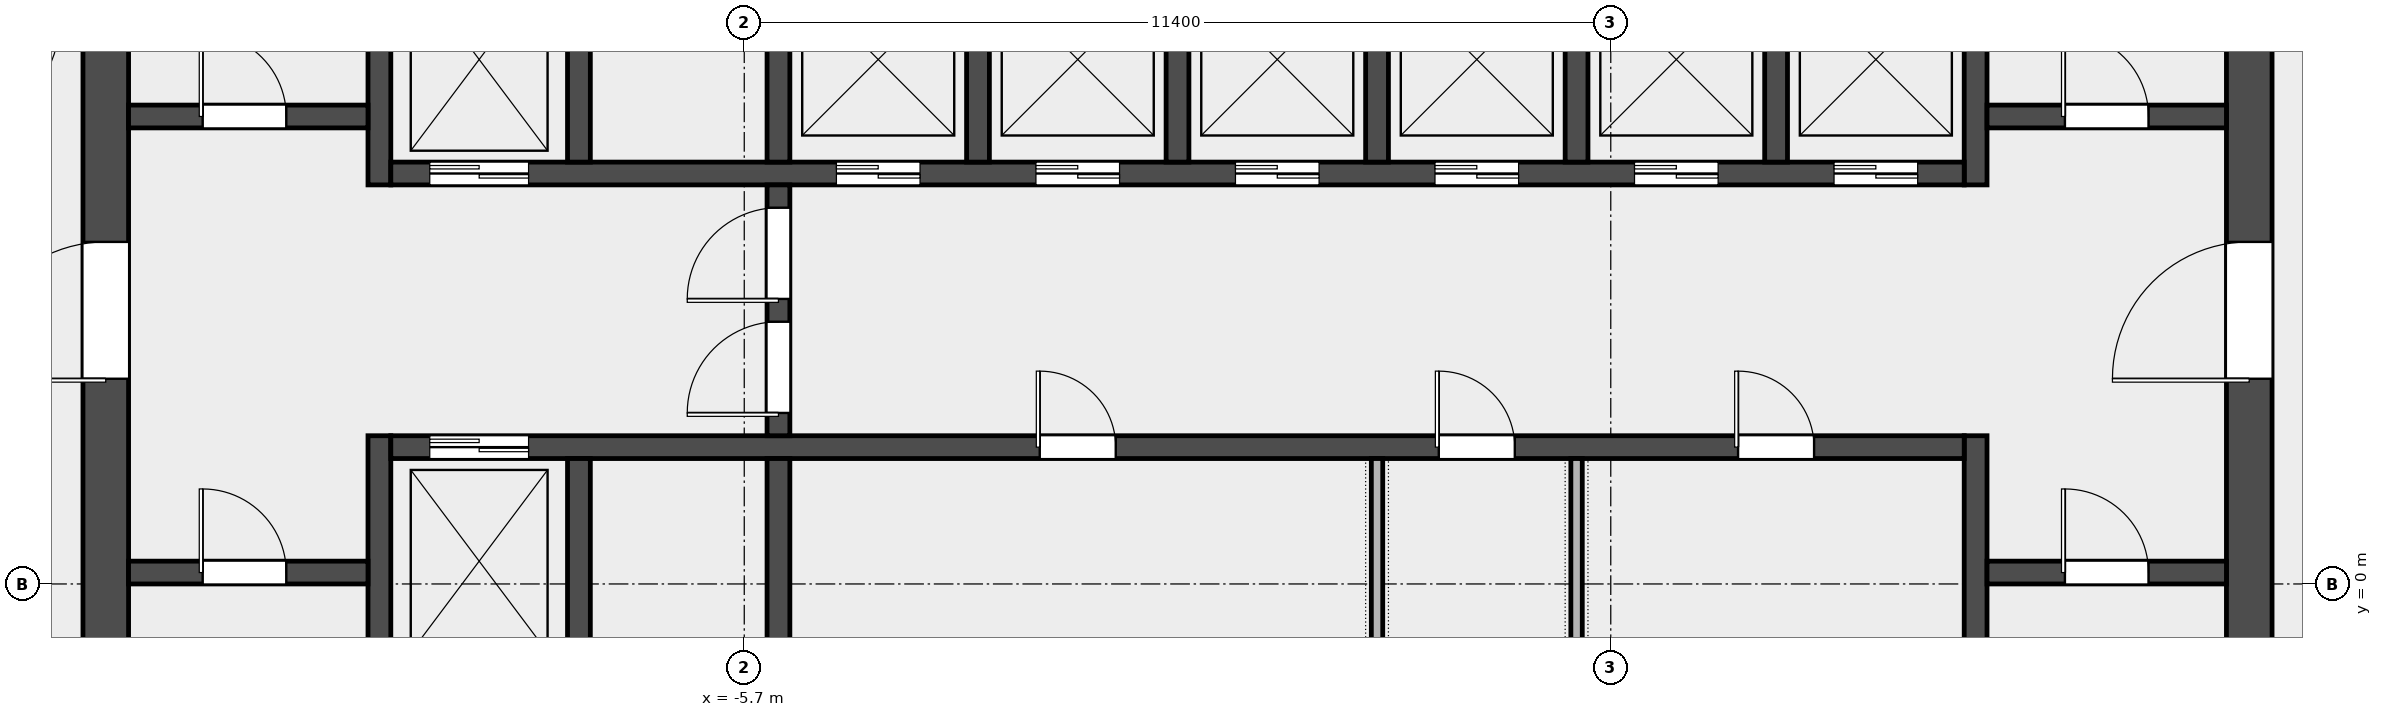
"""IFC4 building model, lengths in metres.
Left out: names, types, materials, properties, quantities, classifications, styles, units other than length and angle.
Written with IfcOpenShell. Run it as: python <this file> out.ifc"""

import sys

from ifc_helpers import new_model, si_unit, direction, frame, frame_2d, origin, place, context, subcontext, project, spatial, rectangle, extrude, element, fill, save


model = new_model("IFC4")
c1 = context("Model", 3, precision=1e-05, world=origin(), true_north=direction((0.0, 1.0)))
c2 = subcontext(c1, "Body", "Model", "MODEL_VIEW")
j1 = project(units=[si_unit("LENGTHUNIT", "METRE"), si_unit("PLANEANGLEUNIT", "RADIAN")], contexts=[c1])
p1 = place(None, origin())
s1 = spatial("IfcSite", under=j1, at=p1, CompositionType="ELEMENT")
p2 = place(p1, origin())
s2 = spatial("IfcBuilding", under=s1, at=p2, CompositionType="ELEMENT")
p3 = place(p2, frame((0.0, 0.0, 255.0)))
s3 = spatial("IfcBuildingStorey", under=s2, at=p3, CompositionType="ELEMENT", Elevation=255.0)
p4 = place(p3, frame((-14.1, -6.6, 0.0), z_axis=(0.0, 0.0, 1.0), x_axis=(0.0, 1.0, 0.0)))
e1 = element("IfcWall", 1, at=p4, inside=s3, PredefinedType="SHEAR", context=c2, shape_type="SweptSolid", body=[
    extrude(rectangle(XDim=19.5, YDim=0.6, at=frame_2d((9.75, 0.0))), origin(), (0.0, 0.0, 1.0), 3.7),
])
p5 = place(p4, frame((9.3, 0.0, 0.0)))
e2 = element("IfcOpeningElement", 2, at=p5, cuts=e1, PredefinedType="OPENING", context=c2, shape_type="SweptSolid", body=[
    extrude(rectangle(XDim=1.8, YDim=2.1, at=frame_2d((0.9, 1.05))), frame((0.0, 0.312, 0.0), z_axis=(0.0, -1.0, 0.0), x_axis=(1.0, 0.0, 0.0)), (0.0, 0.0, 1.0), 0.624),
])
p6 = place(p3, frame((14.1, -6.6, 0.0), z_axis=(0.0, 0.0, 1.0), x_axis=(0.0, 1.0, 0.0)))
e3 = element("IfcWall", 3, at=p6, inside=s3, PredefinedType="SHEAR", context=c2, shape_type="SweptSolid", body=[
    extrude(rectangle(XDim=19.5, YDim=0.6, at=frame_2d((9.75, 0.0))), origin(), (0.0, 0.0, 1.0), 3.7),
])
p7 = place(p6, frame((9.3, 0.0, 0.0)))
e4 = element("IfcOpeningElement", 4, at=p7, cuts=e3, PredefinedType="OPENING", context=c2, shape_type="SweptSolid", body=[
    extrude(rectangle(XDim=1.8, YDim=2.1, at=frame_2d((0.9, 1.05))), frame((0.0, 0.312, 0.0), z_axis=(0.0, -1.0, 0.0), x_axis=(1.0, 0.0, 0.0)), (0.0, 0.0, 1.0), 0.624),
])
p8 = place(p3, frame((-10.5, -6.6, 0.0), z_axis=(0.0, 0.0, 1.0), x_axis=(0.0, 1.0, 0.0)))
e5 = element("IfcWall", 5, at=p8, inside=s3, PredefinedType="SHEAR", context=c2, shape_type="SweptSolid", body=[
    extrude(rectangle(XDim=8.55, YDim=0.3, at=frame_2d((4.275, 0.0))), origin(), (0.0, 0.0, 1.0), 3.7),
])
p9 = place(p3, frame((-10.5, 5.25, 0.0), z_axis=(0.0, 0.0, 1.0), x_axis=(0.0, 1.0, 0.0)))
e6 = element("IfcWall", 6, at=p9, inside=s3, PredefinedType="SHEAR", context=c2, shape_type="SweptSolid", body=[
    extrude(rectangle(XDim=7.65, YDim=0.3, at=frame_2d((3.825, 0.0))), origin(), (0.0, 0.0, 1.0), 3.7),
])
p10 = place(p3, frame((10.5, -6.6, 0.0), z_axis=(0.0, 0.0, 1.0), x_axis=(0.0, 1.0, 0.0)))
e7 = element("IfcWall", 7, at=p10, inside=s3, PredefinedType="SHEAR", context=c2, shape_type="SweptSolid", body=[
    extrude(rectangle(XDim=8.55, YDim=0.3, at=frame_2d((4.275, 0.0))), origin(), (0.0, 0.0, 1.0), 3.7),
])
p11 = place(p3, frame((10.5, 5.25, 0.0), z_axis=(0.0, 0.0, 1.0), x_axis=(0.0, 1.0, 0.0)))
e8 = element("IfcWall", 8, at=p11, inside=s3, PredefinedType="SHEAR", context=c2, shape_type="SweptSolid", body=[
    extrude(rectangle(XDim=7.65, YDim=0.3, at=frame_2d((3.825, 0.0))), origin(), (0.0, 0.0, 1.0), 3.7),
])
p12 = place(p3, frame((-13.8, 0.15, 0.0), z_axis=(0.0, 0.0, 1.0), x_axis=(1.0, 0.0, 0.0)))
e9 = element("IfcWall", 9, at=p12, inside=s3, PredefinedType="SOLIDWALL", context=c2, shape_type="SweptSolid", body=[
    extrude(rectangle(XDim=3.15, YDim=0.3, at=frame_2d((1.575, 0.0))), origin(), (0.0, 0.0, 1.0), 3.7),
])
p13 = place(p12, frame((0.975, 0.0, 0.0)))
e10 = element("IfcOpeningElement", 10, at=p13, cuts=e9, PredefinedType="OPENING", context=c2, shape_type="SweptSolid", body=[
    extrude(rectangle(XDim=1.1, YDim=2.1, at=frame_2d((0.55, 1.05))), frame((0.0, 0.162, 0.0), z_axis=(0.0, -1.0, 0.0), x_axis=(1.0, 0.0, 0.0)), (0.0, 0.0, 1.0), 0.324),
])
p14 = place(p3, frame((-13.8, 6.15, 0.0), z_axis=(0.0, 0.0, 1.0), x_axis=(1.0, 0.0, 0.0)))
e11 = element("IfcWall", 11, at=p14, inside=s3, PredefinedType="SOLIDWALL", context=c2, shape_type="SweptSolid", body=[
    extrude(rectangle(XDim=3.15, YDim=0.3, at=frame_2d((1.575, 0.0))), origin(), (0.0, 0.0, 1.0), 3.7),
])
p15 = place(p14, frame((0.975, 0.0, 0.0)))
e12 = element("IfcOpeningElement", 12, at=p15, cuts=e11, PredefinedType="OPENING", context=c2, shape_type="SweptSolid", body=[
    extrude(rectangle(XDim=1.1, YDim=2.1, at=frame_2d((0.55, 1.05))), frame((0.0, 0.162, 0.0), z_axis=(0.0, -1.0, 0.0), x_axis=(1.0, 0.0, 0.0)), (0.0, 0.0, 1.0), 0.324),
])
p16 = place(p3, frame((10.65, 0.15, 0.0), z_axis=(0.0, 0.0, 1.0), x_axis=(1.0, 0.0, 0.0)))
e13 = element("IfcWall", 13, at=p16, inside=s3, PredefinedType="SOLIDWALL", context=c2, shape_type="SweptSolid", body=[
    extrude(rectangle(XDim=3.15, YDim=0.3, at=frame_2d((1.575, 0.0))), origin(), (0.0, 0.0, 1.0), 3.7),
])
p17 = place(p16, frame((1.025, 0.0, 0.0)))
e14 = element("IfcOpeningElement", 14, at=p17, cuts=e13, PredefinedType="OPENING", context=c2, shape_type="SweptSolid", body=[
    extrude(rectangle(XDim=1.1, YDim=2.1, at=frame_2d((0.55, 1.05))), frame((0.0, 0.162, 0.0), z_axis=(0.0, -1.0, 0.0), x_axis=(1.0, 0.0, 0.0)), (0.0, 0.0, 1.0), 0.324),
])
p18 = place(p3, frame((10.65, 6.15, 0.0), z_axis=(0.0, 0.0, 1.0), x_axis=(1.0, 0.0, 0.0)))
e15 = element("IfcWall", 15, at=p18, inside=s3, PredefinedType="SOLIDWALL", context=c2, shape_type="SweptSolid", body=[
    extrude(rectangle(XDim=3.15, YDim=0.3, at=frame_2d((1.575, 0.0))), origin(), (0.0, 0.0, 1.0), 3.7),
])
p19 = place(p18, frame((1.025, 0.0, 0.0)))
e16 = element("IfcOpeningElement", 16, at=p19, cuts=e15, PredefinedType="OPENING", context=c2, shape_type="SweptSolid", body=[
    extrude(rectangle(XDim=1.1, YDim=2.1, at=frame_2d((0.55, 1.05))), frame((0.0, 0.162, 0.0), z_axis=(0.0, -1.0, 0.0), x_axis=(1.0, 0.0, 0.0)), (0.0, 0.0, 1.0), 0.324),
])
p20 = place(p3, frame((-10.35, 1.8, 0.0), z_axis=(0.0, 0.0, 1.0), x_axis=(1.0, 0.0, 0.0)))
e17 = element("IfcWall", 17, at=p20, inside=s3, PredefinedType="SOLIDWALL", context=c2, shape_type="SweptSolid", body=[
    extrude(rectangle(XDim=20.7, YDim=0.3, at=frame_2d((10.35, 0.0))), origin(), (0.0, 0.0, 1.0), 3.7),
])
p21 = place(p20, frame((0.512, 0.0, 0.0)))
e18 = element("IfcOpeningElement", 18, at=p21, cuts=e17, PredefinedType="OPENING", context=c2, shape_type="SweptSolid", body=[
    extrude(rectangle(XDim=1.3, YDim=2.1, at=frame_2d((0.65, 1.05))), frame((0.0, 0.162, 0.0), z_axis=(0.0, -1.0, 0.0), x_axis=(1.0, 0.0, 0.0)), (0.0, 0.0, 1.0), 0.324),
])
p22 = place(p20, frame((8.538, 0.0, 0.0)))
e19 = element("IfcOpeningElement", 19, at=p22, cuts=e17, PredefinedType="OPENING", context=c2, shape_type="SweptSolid", body=[
    extrude(rectangle(XDim=1.0, YDim=2.1, at=frame_2d((0.5, 1.05))), frame((0.0, 0.162, 0.0), z_axis=(0.0, -1.0, 0.0), x_axis=(1.0, 0.0, 0.0)), (0.0, 0.0, 1.0), 0.324),
])
p23 = place(p20, frame((13.788, 0.0, 0.0)))
e20 = element("IfcOpeningElement", 20, at=p23, cuts=e17, PredefinedType="OPENING", context=c2, shape_type="SweptSolid", body=[
    extrude(rectangle(XDim=1.0, YDim=2.1, at=frame_2d((0.5, 1.05))), frame((0.0, 0.162, 0.0), z_axis=(0.0, -1.0, 0.0), x_axis=(1.0, 0.0, 0.0)), (0.0, 0.0, 1.0), 0.324),
])
p24 = place(p20, frame((17.725, 0.0, 0.0)))
e21 = element("IfcOpeningElement", 21, at=p24, cuts=e17, PredefinedType="OPENING", context=c2, shape_type="SweptSolid", body=[
    extrude(rectangle(XDim=1.0, YDim=2.1, at=frame_2d((0.5, 1.05))), frame((0.0, 0.162, 0.0), z_axis=(0.0, -1.0, 0.0), x_axis=(1.0, 0.0, 0.0)), (0.0, 0.0, 1.0), 0.324),
])
p25 = place(p3, frame((-10.35, 5.4, 0.0), z_axis=(0.0, 0.0, 1.0), x_axis=(1.0, 0.0, 0.0)))
e22 = element("IfcWall", 22, at=p25, inside=s3, PredefinedType="SOLIDWALL", context=c2, shape_type="SweptSolid", body=[
    extrude(rectangle(XDim=20.7, YDim=0.3, at=frame_2d((10.35, 0.0))), origin(), (0.0, 0.0, 1.0), 3.7),
])
p26 = place(p25, frame((0.512, 0.0, 0.0)))
e23 = element("IfcOpeningElement", 23, at=p26, cuts=e22, PredefinedType="OPENING", context=c2, shape_type="SweptSolid", body=[
    extrude(rectangle(XDim=1.3, YDim=2.1, at=frame_2d((0.65, 1.05))), frame((0.0, 0.162, 0.0), z_axis=(0.0, -1.0, 0.0), x_axis=(1.0, 0.0, 0.0)), (0.0, 0.0, 1.0), 0.324),
])
p27 = place(p25, frame((5.863, 0.0, 0.0)))
e24 = element("IfcOpeningElement", 24, at=p27, cuts=e22, PredefinedType="OPENING", context=c2, shape_type="SweptSolid", body=[
    extrude(rectangle(XDim=1.1, YDim=2.1, at=frame_2d((0.55, 1.05))), frame((0.0, 0.162, 0.0), z_axis=(0.0, -1.0, 0.0), x_axis=(1.0, 0.0, 0.0)), (0.0, 0.0, 1.0), 0.324),
])
p28 = place(p25, frame((8.488, 0.0, 0.0)))
e25 = element("IfcOpeningElement", 25, at=p28, cuts=e22, PredefinedType="OPENING", context=c2, shape_type="SweptSolid", body=[
    extrude(rectangle(XDim=1.1, YDim=2.1, at=frame_2d((0.55, 1.05))), frame((0.0, 0.162, 0.0), z_axis=(0.0, -1.0, 0.0), x_axis=(1.0, 0.0, 0.0)), (0.0, 0.0, 1.0), 0.324),
])
p29 = place(p25, frame((11.113, 0.0, 0.0)))
e26 = element("IfcOpeningElement", 26, at=p29, cuts=e22, PredefinedType="OPENING", context=c2, shape_type="SweptSolid", body=[
    extrude(rectangle(XDim=1.1, YDim=2.1, at=frame_2d((0.55, 1.05))), frame((0.0, 0.162, 0.0), z_axis=(0.0, -1.0, 0.0), x_axis=(1.0, 0.0, 0.0)), (0.0, 0.0, 1.0), 0.324),
])
p30 = place(p25, frame((13.738, 0.0, 0.0)))
e27 = element("IfcOpeningElement", 27, at=p30, cuts=e22, PredefinedType="OPENING", context=c2, shape_type="SweptSolid", body=[
    extrude(rectangle(XDim=1.1, YDim=2.1, at=frame_2d((0.55, 1.05))), frame((0.0, 0.162, 0.0), z_axis=(0.0, -1.0, 0.0), x_axis=(1.0, 0.0, 0.0)), (0.0, 0.0, 1.0), 0.324),
])
p31 = place(p25, frame((16.363, 0.0, 0.0)))
e28 = element("IfcOpeningElement", 28, at=p31, cuts=e22, PredefinedType="OPENING", context=c2, shape_type="SweptSolid", body=[
    extrude(rectangle(XDim=1.1, YDim=2.1, at=frame_2d((0.55, 1.05))), frame((0.0, 0.162, 0.0), z_axis=(0.0, -1.0, 0.0), x_axis=(1.0, 0.0, 0.0)), (0.0, 0.0, 1.0), 0.324),
])
p32 = place(p25, frame((18.988, 0.0, 0.0)))
e29 = element("IfcOpeningElement", 29, at=p32, cuts=e22, PredefinedType="OPENING", context=c2, shape_type="SweptSolid", body=[
    extrude(rectangle(XDim=1.1, YDim=2.1, at=frame_2d((0.55, 1.05))), frame((0.0, 0.162, 0.0), z_axis=(0.0, -1.0, 0.0), x_axis=(1.0, 0.0, 0.0)), (0.0, 0.0, 1.0), 0.324),
])
for number, where, z_axis, x_axis in (
    (30, (-7.875, -1.05, 0.0), (0.0, 0.0, 1.0), (0.0, 1.0, 0.0)),
    (31, (-5.25, -1.05, 0.0), (0.0, 0.0, 1.0), (0.0, 1.0, 0.0)),
    (32, (-7.875, 5.55, 0.0), (0.0, 0.0, 1.0), (0.0, 1.0, 0.0)),
    (33, (-5.25, 5.55, 0.0), (0.0, 0.0, 1.0), (0.0, 1.0, 0.0)),
    (34, (-2.625, 5.55, 0.0), (0.0, 0.0, 1.0), (0.0, 1.0, 0.0)),
    (35, (0.0, 5.55, 0.0), (0.0, 0.0, 1.0), (0.0, 1.0, 0.0)),
    (36, (2.625, 5.55, 0.0), (0.0, 0.0, 1.0), (0.0, 1.0, 0.0)),
    (37, (5.25, 5.55, 0.0), (0.0, 0.0, 1.0), (0.0, 1.0, 0.0)),
    (38, (7.875, 5.55, 0.0), (0.0, 0.0, 1.0), (0.0, 1.0, 0.0)),
):
    element("IfcWall", number, at=place(p3, frame(where, z_axis=z_axis, x_axis=x_axis)), inside=s3, PredefinedType="SOLIDWALL", context=c2, shape_type="SweptSolid", body=[
        extrude(rectangle(XDim=2.7, YDim=0.3, at=frame_2d((1.35, 0.0))), origin(), (0.0, 0.0, 1.0), 3.7),
    ])
p33 = place(p3, frame((-5.25, 1.95, 0.0), z_axis=(0.0, 0.0, 1.0), x_axis=(0.0, 1.0, 0.0)))
e39 = element("IfcWall", 39, at=p33, inside=s3, PredefinedType="SOLIDWALL", context=c2, shape_type="SweptSolid", body=[
    extrude(rectangle(XDim=3.3, YDim=0.3, at=frame_2d((1.65, 0.0))), origin(), (0.0, 0.0, 1.0), 3.7),
])
p34 = place(p33, frame((0.3, 0.0, 0.0)))
e40 = element("IfcOpeningElement", 40, at=p34, cuts=e39, PredefinedType="OPENING", context=c2, shape_type="SweptSolid", body=[
    extrude(rectangle(XDim=1.2, YDim=2.1, at=frame_2d((0.6, 1.05))), frame((0.0, 0.162, 0.0), z_axis=(0.0, -1.0, 0.0), x_axis=(1.0, 0.0, 0.0)), (0.0, 0.0, 1.0), 0.324),
])
p35 = place(p33, frame((1.8, 0.0, 0.0)))
e41 = element("IfcOpeningElement", 41, at=p35, cuts=e39, PredefinedType="OPENING", context=c2, shape_type="SweptSolid", body=[
    extrude(rectangle(XDim=1.2, YDim=2.1, at=frame_2d((0.6, 1.05))), frame((0.0, 0.162, 0.0), z_axis=(0.0, -1.0, 0.0), x_axis=(1.0, 0.0, 0.0)), (0.0, 0.0, 1.0), 0.324),
])
for number, where, z_axis, x_axis in (
    (42, (2.625, -1.05, 0.0), (0.0, 0.0, 1.0), (0.0, 1.0, 0.0)),
    (43, (5.25, -1.05, 0.0), (0.0, 0.0, 1.0), (0.0, 1.0, 0.0)),
):
    element("IfcWall", number, at=place(p3, frame(where, z_axis=z_axis, x_axis=x_axis)), inside=s3, PredefinedType="PARTITIONING", context=c2, shape_type="SweptSolid", body=[
        extrude(rectangle(XDim=2.7, YDim=0.15, at=frame_2d((1.35, 0.0))), origin(), (0.0, 0.0, 1.0), 3.7),
    ])
p36 = place(p13, origin())
e44 = element("IfcDoor", 44, at=p36, inside=s3, OperationType="SINGLE_SWING_LEFT", PredefinedType="DOOR", context=c2, shape_type="SweptSolid", body=[
    extrude(rectangle(XDim=1.1, YDim=2.1, at=frame_2d((0.55, 1.05))), frame((0.0, 0.025, 0.0), z_axis=(0.0, -1.0, 0.0), x_axis=(1.0, 0.0, 0.0)), (0.0, 0.0, 1.0), 0.05),
])
fill(e10, e44)
p37 = place(p15, origin())
e45 = element("IfcDoor", 45, at=p37, inside=s3, OperationType="SINGLE_SWING_LEFT", PredefinedType="DOOR", context=c2, shape_type="SweptSolid", body=[
    extrude(rectangle(XDim=1.1, YDim=2.1, at=frame_2d((0.55, 1.05))), frame((0.0, 0.025, 0.0), z_axis=(0.0, -1.0, 0.0), x_axis=(1.0, 0.0, 0.0)), (0.0, 0.0, 1.0), 0.05),
])
fill(e12, e45)
p38 = place(p17, origin())
e46 = element("IfcDoor", 46, at=p38, inside=s3, OperationType="SINGLE_SWING_RIGHT", PredefinedType="DOOR", context=c2, shape_type="SweptSolid", body=[
    extrude(rectangle(XDim=1.1, YDim=2.1, at=frame_2d((0.55, 1.05))), frame((0.0, 0.025, 0.0), z_axis=(0.0, -1.0, 0.0), x_axis=(1.0, 0.0, 0.0)), (0.0, 0.0, 1.0), 0.05),
])
fill(e14, e46)
p39 = place(p19, origin())
e47 = element("IfcDoor", 47, at=p39, inside=s3, OperationType="SINGLE_SWING_RIGHT", PredefinedType="DOOR", context=c2, shape_type="SweptSolid", body=[
    extrude(rectangle(XDim=1.1, YDim=2.1, at=frame_2d((0.55, 1.05))), frame((0.0, 0.025, 0.0), z_axis=(0.0, -1.0, 0.0), x_axis=(1.0, 0.0, 0.0)), (0.0, 0.0, 1.0), 0.05),
])
fill(e16, e47)
p40 = place(p5, origin())
e48 = element("IfcDoor", 48, at=p40, inside=s3, OperationType="DOUBLE_DOOR_SINGLE_SWING", PredefinedType="DOOR", context=c2, shape_type="SweptSolid", body=[
    extrude(rectangle(XDim=1.8, YDim=2.1, at=frame_2d((0.9, 1.05))), frame((0.0, 0.025, 0.0), z_axis=(0.0, -1.0, 0.0), x_axis=(1.0, 0.0, 0.0)), (0.0, 0.0, 1.0), 0.05),
])
fill(e2, e48)
p41 = place(p7, origin())
e49 = element("IfcDoor", 49, at=p41, inside=s3, OperationType="DOUBLE_DOOR_SINGLE_SWING", PredefinedType="DOOR", context=c2, shape_type="SweptSolid", body=[
    extrude(rectangle(XDim=1.8, YDim=2.1, at=frame_2d((0.9, 1.05))), frame((0.0, 0.025, 0.0), z_axis=(0.0, -1.0, 0.0), x_axis=(1.0, 0.0, 0.0)), (0.0, 0.0, 1.0), 0.05),
])
fill(e4, e49)
p42 = place(p34, origin())
e50 = element("IfcDoor", 50, at=p42, inside=s3, OperationType="SINGLE_SWING_LEFT", PredefinedType="DOOR", context=c2, shape_type="SweptSolid", body=[
    extrude(rectangle(XDim=1.2, YDim=2.1, at=frame_2d((0.6, 1.05))), frame((0.0, 0.025, 0.0), z_axis=(0.0, -1.0, 0.0), x_axis=(1.0, 0.0, 0.0)), (0.0, 0.0, 1.0), 0.05),
])
fill(e40, e50)
p43 = place(p35, origin())
e51 = element("IfcDoor", 51, at=p43, inside=s3, OperationType="SINGLE_SWING_RIGHT", PredefinedType="DOOR", context=c2, shape_type="SweptSolid", body=[
    extrude(rectangle(XDim=1.2, YDim=2.1, at=frame_2d((0.6, 1.05))), frame((0.0, 0.025, 0.0), z_axis=(0.0, -1.0, 0.0), x_axis=(1.0, 0.0, 0.0)), (0.0, 0.0, 1.0), 0.05),
])
fill(e41, e51)
p44 = place(p21, origin())
e52 = element("IfcDoor", 52, at=p44, inside=s3, OperationType="DOUBLE_DOOR_SLIDING", PredefinedType="DOOR", context=c2, shape_type="SweptSolid", body=[
    extrude(rectangle(XDim=1.3, YDim=2.1, at=frame_2d((0.65, 1.05))), frame((0.0, 0.025, 0.0), z_axis=(0.0, -1.0, 0.0), x_axis=(1.0, 0.0, 0.0)), (0.0, 0.0, 1.0), 0.05),
])
fill(e18, e52)
p45 = place(p26, origin())
e53 = element("IfcDoor", 53, at=p45, inside=s3, OperationType="DOUBLE_DOOR_SLIDING", PredefinedType="DOOR", context=c2, shape_type="SweptSolid", body=[
    extrude(rectangle(XDim=1.3, YDim=2.1, at=frame_2d((0.65, 1.05))), frame((0.0, 0.025, 0.0), z_axis=(0.0, -1.0, 0.0), x_axis=(1.0, 0.0, 0.0)), (0.0, 0.0, 1.0), 0.05),
])
fill(e23, e53)
p46 = place(p27, origin())
e54 = element("IfcDoor", 54, at=p46, inside=s3, OperationType="DOUBLE_DOOR_SLIDING", PredefinedType="DOOR", context=c2, shape_type="SweptSolid", body=[
    extrude(rectangle(XDim=1.1, YDim=2.1, at=frame_2d((0.55, 1.05))), frame((0.0, 0.025, 0.0), z_axis=(0.0, -1.0, 0.0), x_axis=(1.0, 0.0, 0.0)), (0.0, 0.0, 1.0), 0.05),
])
fill(e24, e54)
p47 = place(p28, origin())
e55 = element("IfcDoor", 55, at=p47, inside=s3, OperationType="DOUBLE_DOOR_SLIDING", PredefinedType="DOOR", context=c2, shape_type="SweptSolid", body=[
    extrude(rectangle(XDim=1.1, YDim=2.1, at=frame_2d((0.55, 1.05))), frame((0.0, 0.025, 0.0), z_axis=(0.0, -1.0, 0.0), x_axis=(1.0, 0.0, 0.0)), (0.0, 0.0, 1.0), 0.05),
])
fill(e25, e55)
p48 = place(p29, origin())
e56 = element("IfcDoor", 56, at=p48, inside=s3, OperationType="DOUBLE_DOOR_SLIDING", PredefinedType="DOOR", context=c2, shape_type="SweptSolid", body=[
    extrude(rectangle(XDim=1.1, YDim=2.1, at=frame_2d((0.55, 1.05))), frame((0.0, 0.025, 0.0), z_axis=(0.0, -1.0, 0.0), x_axis=(1.0, 0.0, 0.0)), (0.0, 0.0, 1.0), 0.05),
])
fill(e26, e56)
p49 = place(p30, origin())
e57 = element("IfcDoor", 57, at=p49, inside=s3, OperationType="DOUBLE_DOOR_SLIDING", PredefinedType="DOOR", context=c2, shape_type="SweptSolid", body=[
    extrude(rectangle(XDim=1.1, YDim=2.1, at=frame_2d((0.55, 1.05))), frame((0.0, 0.025, 0.0), z_axis=(0.0, -1.0, 0.0), x_axis=(1.0, 0.0, 0.0)), (0.0, 0.0, 1.0), 0.05),
])
fill(e27, e57)
p50 = place(p31, origin())
e58 = element("IfcDoor", 58, at=p50, inside=s3, OperationType="DOUBLE_DOOR_SLIDING", PredefinedType="DOOR", context=c2, shape_type="SweptSolid", body=[
    extrude(rectangle(XDim=1.1, YDim=2.1, at=frame_2d((0.55, 1.05))), frame((0.0, 0.025, 0.0), z_axis=(0.0, -1.0, 0.0), x_axis=(1.0, 0.0, 0.0)), (0.0, 0.0, 1.0), 0.05),
])
fill(e28, e58)
p51 = place(p32, origin())
e59 = element("IfcDoor", 59, at=p51, inside=s3, OperationType="DOUBLE_DOOR_SLIDING", PredefinedType="DOOR", context=c2, shape_type="SweptSolid", body=[
    extrude(rectangle(XDim=1.1, YDim=2.1, at=frame_2d((0.55, 1.05))), frame((0.0, 0.025, 0.0), z_axis=(0.0, -1.0, 0.0), x_axis=(1.0, 0.0, 0.0)), (0.0, 0.0, 1.0), 0.05),
])
fill(e29, e59)
p52 = place(p22, origin())
e60 = element("IfcDoor", 60, at=p52, inside=s3, OperationType="SINGLE_SWING_LEFT", PredefinedType="DOOR", context=c2, shape_type="SweptSolid", body=[
    extrude(rectangle(XDim=1.0, YDim=2.1, at=frame_2d((0.5, 1.05))), frame((0.0, 0.025, 0.0), z_axis=(0.0, -1.0, 0.0), x_axis=(1.0, 0.0, 0.0)), (0.0, 0.0, 1.0), 0.05),
])
fill(e19, e60)
p53 = place(p23, origin())
e61 = element("IfcDoor", 61, at=p53, inside=s3, OperationType="SINGLE_SWING_LEFT", PredefinedType="DOOR", context=c2, shape_type="SweptSolid", body=[
    extrude(rectangle(XDim=1.0, YDim=2.1, at=frame_2d((0.5, 1.05))), frame((0.0, 0.025, 0.0), z_axis=(0.0, -1.0, 0.0), x_axis=(1.0, 0.0, 0.0)), (0.0, 0.0, 1.0), 0.05),
])
fill(e20, e61)
p54 = place(p24, origin())
e62 = element("IfcDoor", 62, at=p54, inside=s3, OperationType="SINGLE_SWING_LEFT", PredefinedType="DOOR", context=c2, shape_type="SweptSolid", body=[
    extrude(rectangle(XDim=1.0, YDim=2.1, at=frame_2d((0.5, 1.05))), frame((0.0, 0.025, 0.0), z_axis=(0.0, -1.0, 0.0), x_axis=(1.0, 0.0, 0.0)), (0.0, 0.0, 1.0), 0.05),
])
fill(e21, e62)
save(model, sys.argv[1])
